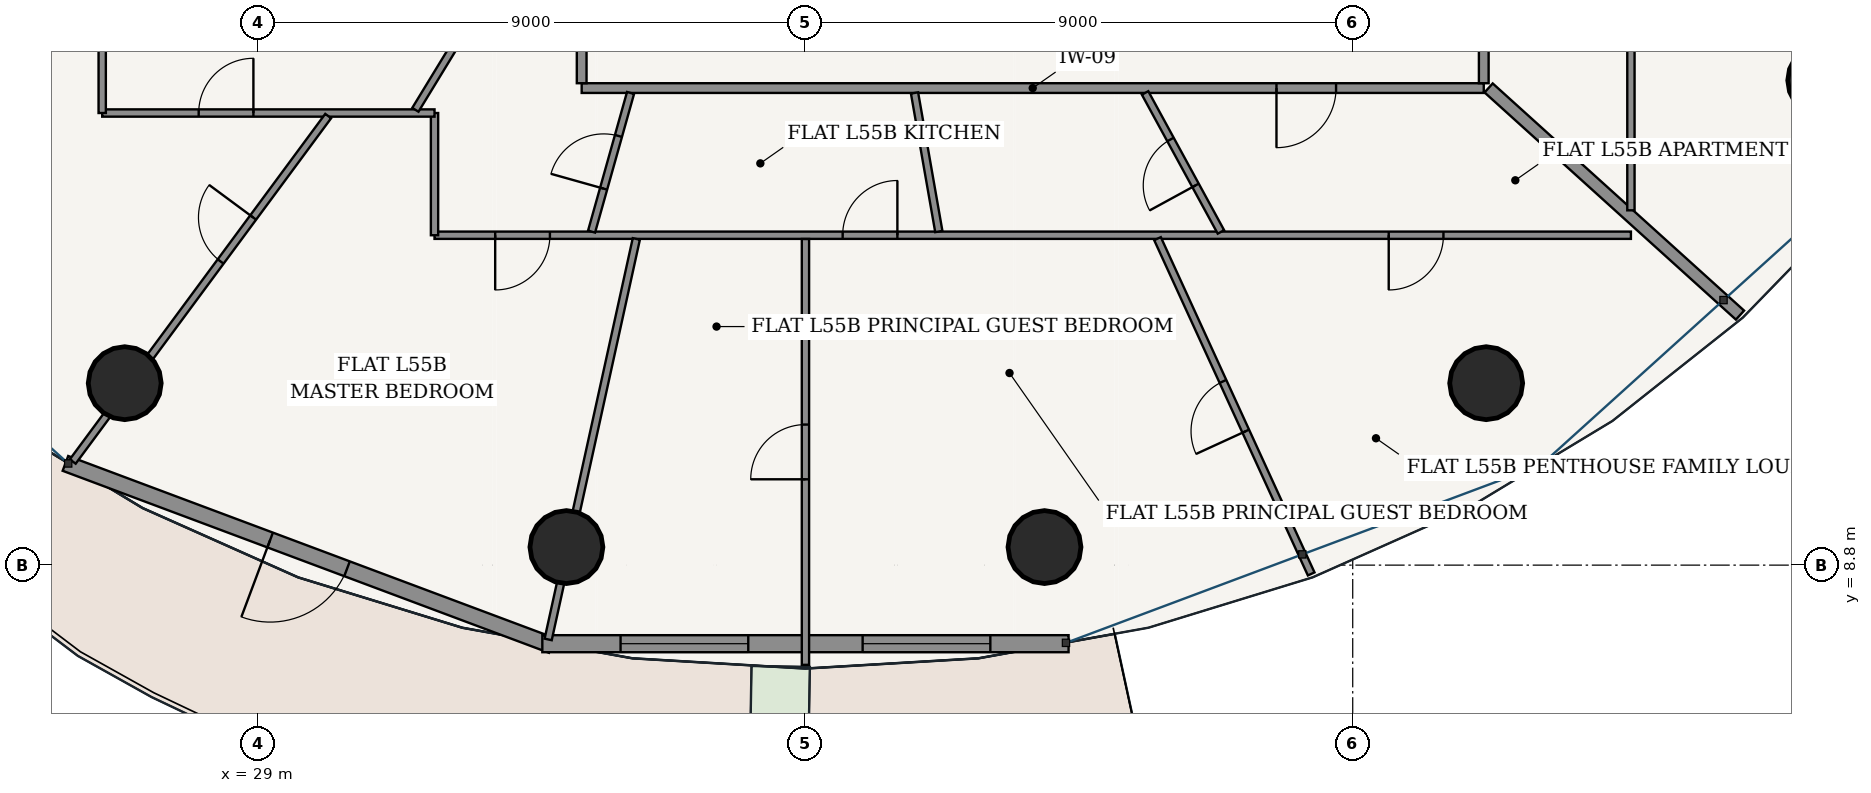
"""IFC4 building model, lengths in metres.
Left out: names, types, materials, properties, quantities, classifications, styles, units other than length and angle.
Written with IfcOpenShell. Run it as: python <this file> out.ifc"""

import sys

from ifc_helpers import new_model, si_unit, direction, frame, frame_2d, origin, origin_2d, place, context, subcontext, project, spatial, rectangle, hollow_circle, extrude, source, transform, mapped, element, fill, save


model = new_model("IFC4")
c1 = context("Model", 3, precision=1e-05, world=origin(), true_north=direction((-0.2419218956, 0.970295726276)))
c2 = subcontext(c1, "Body", "Model", "MODEL_VIEW")
j1 = project(units=[si_unit("LENGTHUNIT", "METRE"), si_unit("PLANEANGLEUNIT", "RADIAN")], contexts=[c1])
p1 = place(None, origin())
s1 = spatial("IfcSite", under=j1, at=p1, CompositionType="ELEMENT")
p2 = place(p1, origin())
s2 = spatial("IfcBuilding", under=s1, at=p2, CompositionType="ELEMENT")
p3 = place(p2, frame((0.0, 0.0, 209.7)))
s3 = spatial("IfcBuildingStorey", under=s2, at=p3, CompositionType="ELEMENT", Elevation=209.7)
for number, where, z_axis, x_axis in (
    (1, (26.805, 11.792, 0.0), (0.0, 0.0, 1.0), (1.0, 0.0, 0.0)),
    (2, (34.069, 9.097, 0.0), (0.0, 0.0, 1.0), (1.0, 0.0, 0.0)),
    (3, (41.931, 9.097, 0.0), (0.0, 0.0, 1.0), (1.0, 0.0, 0.0)),
    (4, (49.195, 11.792, 0.0), (0.0, 0.0, 1.0), (1.0, 0.0, 0.0)),
    (5, (54.754, 16.772, 0.0), (0.0, 0.0, 1.0), (1.0, 0.0, 0.0)),
):
    element("IfcColumn", number, at=place(p3, frame(where, z_axis=z_axis, x_axis=x_axis)), inside=s3, PredefinedType="COLUMN", context=c2, shape_type="SweptSolid", body=[
        extrude(hollow_circle(Radius=0.6, WallThickness=0.038, at=origin_2d()), origin(), (0.0, 0.0, 1.0), 3.7),
    ])
p4 = place(p3, frame((25.83, 10.473, 0.0), z_axis=(0.0, 0.0, 1.0), x_axis=(0.936556918375, -0.350515532672, 0.0)))
e6 = element("IfcWall", 6, at=p4, inside=s3, PredefinedType="SOLIDWALL", context=c2, shape_type="SweptSolid", body=[
    extrude(rectangle(XDim=8.539, YDim=0.26, at=frame_2d((4.27, 0.0))), origin(), (0.0, 0.0, 1.0), 3.435),
])
p5 = place(p4, frame((3.594, 0.0, 0.0)))
e7 = element("IfcOpeningElement", 7, at=p5, cuts=e6, PredefinedType="OPENING", context=c2, shape_type="SweptSolid", body=[
    extrude(rectangle(XDim=1.35, YDim=2.2, at=frame_2d((0.675, 1.1))), frame((0.0, 0.14, 0.0), z_axis=(0.0, -1.0, 0.0), x_axis=(1.0, 0.0, 0.0)), (0.0, 0.0, 1.0), 0.28),
])
p6 = place(p3, frame((33.673, 7.508, 0.0), z_axis=(0.0, 0.0, 1.0), x_axis=(1.0, 0.0, 0.0)))
e8 = element("IfcWall", 8, at=p6, inside=s3, PredefinedType="SOLIDWALL", context=c2, shape_type="SweptSolid", body=[
    extrude(rectangle(XDim=8.654, YDim=0.28, at=frame_2d((4.327, 0.0))), origin(), (0.0, 0.0, 1.0), 3.435),
])
p7 = place(p6, frame((1.287, 0.0, 0.85)))
e9 = element("IfcOpeningElement", 9, at=p7, cuts=e8, PredefinedType="OPENING", context=c2, shape_type="SweptSolid", body=[
    extrude(rectangle(XDim=2.1, YDim=1.95, at=frame_2d((1.05, 0.975))), frame((0.0, 0.15, 0.0), z_axis=(0.0, -1.0, 0.0), x_axis=(1.0, 0.0, 0.0)), (0.0, 0.0, 1.0), 0.3),
])
p8 = place(p6, frame((5.268, 0.0, 0.85)))
e10 = element("IfcOpeningElement", 10, at=p8, cuts=e8, PredefinedType="OPENING", context=c2, shape_type="SweptSolid", body=[
    extrude(rectangle(XDim=2.1, YDim=1.95, at=frame_2d((1.05, 0.975))), frame((0.0, 0.15, 0.0), z_axis=(0.0, -1.0, 0.0), x_axis=(1.0, 0.0, 0.0)), (0.0, 0.0, 1.0), 0.3),
])
p9 = place(p3, frame((34.32, 16.645, 0.0), z_axis=(0.0, 0.0, 1.0), x_axis=(1.0, 0.0, 0.0)))
e11 = element("IfcWall", 11, at=p9, inside=s3, PredefinedType="PARTITIONING", context=c2, shape_type="SweptSolid", body=[
    extrude(rectangle(XDim=14.835, YDim=0.16, at=frame_2d((7.417, 0.0))), origin(), (0.0, 0.0, 1.0), 2.951),
])
p10 = place(p9, frame((11.426, 0.0, 0.0)))
e12 = element("IfcOpeningElement", 12, at=p10, cuts=e11, PredefinedType="OPENING", context=c2, shape_type="SweptSolid", body=[
    extrude(rectangle(XDim=0.98, YDim=2.2, at=frame_2d((0.49, 1.1))), frame((0.0, 0.09, 0.0), z_axis=(0.0, -1.0, 0.0), x_axis=(1.0, 0.0, 0.0)), (0.0, 0.0, 1.0), 0.18),
])
p11 = place(p3, frame((34.32, 16.725, 0.0), z_axis=(0.0, 0.0, 1.0), x_axis=(0.0, 1.0, 0.0)))
e13 = element("IfcWall", 13, at=p11, inside=s3, PredefinedType="PARTITIONING", context=c2, shape_type="SweptSolid", body=[
    extrude(rectangle(XDim=1.85, YDim=0.16, at=frame_2d((0.925, 0.0))), origin(), (0.0, 0.0, 1.0), 3.435),
])
p12 = place(p3, frame((49.155, 16.725, 0.0), z_axis=(0.0, 0.0, 1.0), x_axis=(0.0, 1.0, 0.0)))
e14 = element("IfcWall", 14, at=p12, inside=s3, PredefinedType="PARTITIONING", context=c2, shape_type="SweptSolid", body=[
    extrude(rectangle(XDim=18.3, YDim=0.16, at=frame_2d((9.15, 0.0))), origin(), (0.0, 0.0, 1.0), 2.951),
])
p13 = place(p12, frame((15.302, 0.0, 0.0)))
e15 = element("IfcOpeningElement", 15, at=p13, cuts=e14, PredefinedType="OPENING", context=c2, shape_type="SweptSolid", body=[
    extrude(rectangle(XDim=0.98, YDim=2.2, at=frame_2d((0.49, 1.1))), frame((0.0, 0.09, 0.0), z_axis=(0.0, -1.0, 0.0), x_axis=(1.0, 0.0, 0.0)), (0.0, 0.0, 1.0), 0.18),
])
p14 = place(p3, frame((51.575, 14.225, 0.0), z_axis=(0.0, 0.0, 1.0), x_axis=(-1.0, 0.0, 0.0)))
e16 = element("IfcWall", 16, at=p14, inside=s3, PredefinedType="PARTITIONING", context=c2, shape_type="SweptSolid", body=[
    extrude(rectangle(XDim=19.675, YDim=0.12, at=frame_2d((9.837, 0.0))), origin(), (0.0, 0.0, 1.0), 2.951),
])
p15 = place(p14, frame((3.083, 0.0, 0.0)))
e17 = element("IfcOpeningElement", 17, at=p15, cuts=e16, PredefinedType="OPENING", context=c2, shape_type="SweptSolid", body=[
    extrude(rectangle(XDim=0.9, YDim=2.15, at=frame_2d((0.45, 1.075))), frame((0.0, 0.07, 0.0), z_axis=(0.0, -1.0, 0.0), x_axis=(1.0, 0.0, 0.0)), (0.0, 0.0, 1.0), 0.14),
])
p16 = place(p14, frame((12.063, 0.0, 0.0)))
e18 = element("IfcOpeningElement", 18, at=p16, cuts=e16, PredefinedType="OPENING", context=c2, shape_type="SweptSolid", body=[
    extrude(rectangle(XDim=0.9, YDim=2.15, at=frame_2d((0.45, 1.075))), frame((0.0, 0.07, 0.0), z_axis=(0.0, -1.0, 0.0), x_axis=(1.0, 0.0, 0.0)), (0.0, 0.0, 1.0), 0.14),
])
p17 = place(p14, frame((17.777, 0.0, 0.0)))
e19 = element("IfcOpeningElement", 19, at=p17, cuts=e16, PredefinedType="OPENING", context=c2, shape_type="SweptSolid", body=[
    extrude(rectangle(XDim=0.9, YDim=2.15, at=frame_2d((0.45, 1.075))), frame((0.0, 0.07, 0.0), z_axis=(0.0, -1.0, 0.0), x_axis=(1.0, 0.0, 0.0)), (0.0, 0.0, 1.0), 0.14),
])
p18 = place(p3, frame((31.9, 14.225, 0.0), z_axis=(0.0, 0.0, 1.0), x_axis=(0.0, 1.0, 0.0)))
e20 = element("IfcWall", 20, at=p18, inside=s3, PredefinedType="PARTITIONING", context=c2, shape_type="SweptSolid", body=[
    extrude(rectangle(XDim=2.01, YDim=0.12, at=frame_2d((1.005, 0.0))), origin(), (0.0, 0.0, 1.0), 3.11),
])
p19 = place(p3, frame((31.9, 16.235, 0.0), z_axis=(0.0, 0.0, 1.0), x_axis=(-1.0, 0.0, 0.0)))
e21 = element("IfcWall", 21, at=p19, inside=s3, PredefinedType="PARTITIONING", context=c2, shape_type="SweptSolid", body=[
    extrude(rectangle(XDim=5.465, YDim=0.12, at=frame_2d((2.732, 0.0))), origin(), (0.0, 0.0, 1.0), 2.951),
])
p20 = place(p19, frame((2.979, 0.0, 0.0)))
e22 = element("IfcOpeningElement", 22, at=p20, cuts=e21, PredefinedType="OPENING", context=c2, shape_type="SweptSolid", body=[
    extrude(rectangle(XDim=0.9, YDim=2.15, at=frame_2d((0.45, 1.075))), frame((0.0, 0.07, 0.0), z_axis=(0.0, -1.0, 0.0), x_axis=(1.0, 0.0, 0.0)), (0.0, 0.0, 1.0), 0.14),
])
p21 = place(p3, frame((26.435, 16.235, 0.0), z_axis=(0.0, 0.0, 1.0), x_axis=(0.0, 1.0, 0.0)))
e23 = element("IfcWall", 23, at=p21, inside=s3, PredefinedType="PARTITIONING", context=c2, shape_type="SweptSolid", body=[
    extrude(rectangle(XDim=5.665, YDim=0.12, at=frame_2d((2.833, 0.0))), origin(), (0.0, 0.0, 1.0), 2.951),
])
p22 = place(p21, frame((3.362, 0.0, 0.0)))
e24 = element("IfcOpeningElement", 24, at=p22, cuts=e23, PredefinedType="OPENING", context=c2, shape_type="SweptSolid", body=[
    extrude(rectangle(XDim=0.86, YDim=2.15, at=frame_2d((0.43, 1.075))), frame((0.0, 0.07, 0.0), z_axis=(0.0, -1.0, 0.0), x_axis=(1.0, 0.0, 0.0)), (0.0, 0.0, 1.0), 0.14),
])
p23 = place(p3, frame((30.151, 16.185, 0.0), z_axis=(0.0, 0.0, 1.0), x_axis=(-0.594540664599, -0.804065543434, 0.0)))
e25 = element("IfcWall", 25, at=p23, inside=s3, PredefinedType="PARTITIONING", context=c2, shape_type="SweptSolid", body=[
    extrude(rectangle(XDim=7.066, YDim=0.12, at=frame_2d((3.533, 0.0))), origin(), (0.0, 0.0, 1.0), 2.951),
])
p24 = place(p23, frame((2.075, 0.0, 0.0)))
e26 = element("IfcOpeningElement", 26, at=p24, cuts=e25, PredefinedType="OPENING", context=c2, shape_type="SweptSolid", body=[
    extrude(rectangle(XDim=0.9, YDim=2.15, at=frame_2d((0.45, 1.075))), frame((0.0, 0.07, 0.0), z_axis=(0.0, -1.0, 0.0), x_axis=(1.0, 0.0, 0.0)), (0.0, 0.0, 1.0), 0.14),
])
p25 = place(p3, frame((35.219, 14.165, 0.0), z_axis=(0.0, 0.0, 1.0), x_axis=(-0.214959845337, -0.976622887758, 0.0)))
e27 = element("IfcWall", 27, at=p25, inside=s3, PredefinedType="PARTITIONING", context=c2, shape_type="SweptSolid", body=[
    extrude(rectangle(XDim=6.744, YDim=0.12, at=frame_2d((3.372, 0.0))), origin(), (0.0, 0.0, 1.0), 2.951),
])
p26 = place(p3, frame((38.0, 14.163, 0.0), z_axis=(0.0, 0.0, 1.0), x_axis=(0.0, -1.0, 0.0)))
e28 = element("IfcWall", 28, at=p26, inside=s3, PredefinedType="PARTITIONING", context=c2, shape_type="SweptSolid", body=[
    extrude(rectangle(XDim=7.003, YDim=0.12, at=frame_2d((3.501, 0.0))), origin(), (0.0, 0.0, 1.0), 2.951),
])
p27 = place(p26, frame((3.052, 0.0, 0.0)))
e29 = element("IfcOpeningElement", 29, at=p27, cuts=e28, PredefinedType="OPENING", context=c2, shape_type="SweptSolid", body=[
    extrude(rectangle(XDim=0.9, YDim=2.15, at=frame_2d((0.45, 1.075))), frame((0.0, 0.07, 0.0), z_axis=(0.0, -1.0, 0.0), x_axis=(1.0, 0.0, 0.0)), (0.0, 0.0, 1.0), 0.14),
])
p28 = place(p3, frame((43.79, 14.169, 0.0), z_axis=(0.0, 0.0, 1.0), x_axis=(0.416687974363, -0.909049576218, 0.0)))
e30 = element("IfcWall", 30, at=p28, inside=s3, PredefinedType="PARTITIONING", context=c2, shape_type="SweptSolid", body=[
    extrude(rectangle(XDim=6.065, YDim=0.12, at=frame_2d((3.033, 0.0))), origin(), (0.0, 0.0, 1.0), 2.951),
])
p29 = place(p28, frame((2.583, 0.0, 0.0)))
e31 = element("IfcOpeningElement", 31, at=p29, cuts=e30, PredefinedType="OPENING", context=c2, shape_type="SweptSolid", body=[
    extrude(rectangle(XDim=0.9, YDim=2.15, at=frame_2d((0.45, 1.075))), frame((0.0, 0.07, 0.0), z_axis=(0.0, -1.0, 0.0), x_axis=(1.0, 0.0, 0.0)), (0.0, 0.0, 1.0), 0.14),
])
p30 = place(p3, frame((32.981, 18.575, 0.0), z_axis=(0.0, 0.0, 1.0), x_axis=(-0.520926540997, -0.853601510592, 0.0)))
e32 = element("IfcWall", 32, at=p30, inside=s3, PredefinedType="PARTITIONING", context=c2, shape_type="SweptSolid", body=[
    extrude(rectangle(XDim=2.679, YDim=0.12, at=frame_2d((1.34, 0.0))), origin(), (0.0, 0.0, 1.0), 3.435),
])
p31 = place(p3, frame((35.124, 16.565, 0.0), z_axis=(0.0, 0.0, 1.0), x_axis=(-0.270566477163, -0.962701293982, 0.0)))
e33 = element("IfcWall", 33, at=p31, inside=s3, PredefinedType="PARTITIONING", context=c2, shape_type="SweptSolid", body=[
    extrude(rectangle(XDim=2.369, YDim=0.12, at=frame_2d((1.184, 0.0))), origin(), (0.0, 0.0, 1.0), 3.435),
])
p32 = place(p31, frame((0.734, 0.0, 0.0)))
e34 = element("IfcOpeningElement", 34, at=p32, cuts=e33, PredefinedType="OPENING", context=c2, shape_type="SweptSolid", body=[
    extrude(rectangle(XDim=0.9, YDim=2.15, at=frame_2d((0.45, 1.075))), frame((0.0, 0.07, 0.0), z_axis=(0.0, -1.0, 0.0), x_axis=(1.0, 0.0, 0.0)), (0.0, 0.0, 1.0), 0.14),
])
p33 = place(p3, frame((39.794, 16.565, 0.0), z_axis=(0.0, 0.0, 1.0), x_axis=(0.172641422295, -0.984984740647, 0.0)))
e35 = element("IfcWall", 35, at=p33, inside=s3, PredefinedType="PARTITIONING", context=c2, shape_type="SweptSolid", body=[
    extrude(rectangle(XDim=2.313, YDim=0.12, at=frame_2d((1.157, 0.0))), origin(), (0.0, 0.0, 1.0), 3.435),
])
p34 = place(p3, frame((43.585, 16.565, 0.0), z_axis=(0.0, 0.0, 1.0), x_axis=(0.479068920965, -0.877777288932, 0.0)))
e36 = element("IfcWall", 36, at=p34, inside=s3, PredefinedType="PARTITIONING", context=c2, shape_type="SweptSolid", body=[
    extrude(rectangle(XDim=2.604, YDim=0.12, at=frame_2d((1.302, 0.0))), origin(), (0.0, 0.0, 1.0), 3.11),
])
p35 = place(p34, frame((0.872, 0.0, 0.0)))
e37 = element("IfcOpeningElement", 37, at=p35, cuts=e36, PredefinedType="OPENING", context=c2, shape_type="SweptSolid", body=[
    extrude(rectangle(XDim=0.86, YDim=2.15, at=frame_2d((0.43, 1.075))), frame((0.0, 0.07, 0.0), z_axis=(0.0, -1.0, 0.0), x_axis=(1.0, 0.0, 0.0)), (0.0, 0.0, 1.0), 0.14),
])
p36 = place(p3, frame((49.235, 16.647, 0.0), z_axis=(0.0, 0.0, 1.0), x_axis=(0.741935290449, -0.670471494387, 0.0)))
e38 = element("IfcWall", 38, at=p36, inside=s3, PredefinedType="PARTITIONING", context=c2, shape_type="SweptSolid", body=[
    extrude(rectangle(XDim=5.572, YDim=0.2, at=frame_2d((2.786, 0.0))), origin(), (0.0, 0.0, 1.0), 2.951),
])
p37 = place(p3, frame((51.575, 37.525, 0.0), z_axis=(0.0, 0.0, 1.0), x_axis=(0.0, -1.0, 0.0)))
e39 = element("IfcWall", 39, at=p37, inside=s3, PredefinedType="PARTITIONING", context=c2, shape_type="SweptSolid", body=[
    extrude(rectangle(XDim=22.89, YDim=0.12, at=frame_2d((11.445, 0.0))), origin(), (0.0, 0.0, 1.0), 2.951),
])
p38 = place(p37, frame((4.102, 0.0, 0.0)))
e40 = element("IfcOpeningElement", 40, at=p38, cuts=e39, PredefinedType="OPENING", context=c2, shape_type="SweptSolid", body=[
    extrude(rectangle(XDim=0.9, YDim=2.15, at=frame_2d((0.45, 1.075))), frame((0.0, 0.07, 0.0), z_axis=(0.0, -1.0, 0.0), x_axis=(1.0, 0.0, 0.0)), (0.0, 0.0, 1.0), 0.14),
])
p39 = place(p37, frame((19.163, 0.0, 0.0)))
e41 = element("IfcOpeningElement", 41, at=p39, cuts=e39, PredefinedType="OPENING", context=c2, shape_type="SweptSolid", body=[
    extrude(rectangle(XDim=0.86, YDim=2.15, at=frame_2d((0.43, 1.075))), frame((0.0, 0.07, 0.0), z_axis=(0.0, -1.0, 0.0), x_axis=(1.0, 0.0, 0.0)), (0.0, 0.0, 1.0), 0.14),
])
p40 = place(p37, frame((13.046, 0.0, 0.0)))
e42 = element("IfcOpeningElement", 42, at=p40, cuts=e39, PredefinedType="OPENING", context=c2, shape_type="SweptSolid", body=[
    extrude(rectangle(XDim=0.9, YDim=2.15, at=frame_2d((0.45, 1.075))), frame((0.0, 0.07, 0.0), z_axis=(0.0, -1.0, 0.0), x_axis=(1.0, 0.0, 0.0)), (0.0, 0.0, 1.0), 0.14),
])
m1 = source(origin(), c2, "Body", "SweptSolid", [
    extrude(rectangle(XDim=1.35, YDim=2.2, at=frame_2d((0.675, 1.1))), frame((0.0, 0.025, 0.0), z_axis=(0.0, -1.0, 0.0), x_axis=(1.0, 0.0, 0.0)), (0.0, 0.0, 1.0), 0.05),
])
p41 = place(p5, frame((1.35, 0.0, 0.0), z_axis=(0.0, 0.0, 1.0), x_axis=(-1.0, 0.0, 0.0)))
e43 = element("IfcDoor", 43, at=p41, inside=s3, OperationType="SINGLE_SWING_RIGHT", PredefinedType="DOOR", context=c2, shape_type="MappedRepresentation", body=[
    mapped(m1, transform((0.0, 0.0, 0.0), scale=1.0)),
])
fill(e7, e43)
m2 = source(origin(), c2, "Body", "SweptSolid", [
    extrude(rectangle(XDim=2.1, YDim=1.95, at=frame_2d((1.05, 0.975))), frame((0.0, 0.03, 0.0), z_axis=(0.0, -1.0, 0.0), x_axis=(1.0, 0.0, 0.0)), (0.0, 0.0, 1.0), 0.06),
])
p42 = place(p7, origin())
e44 = element("IfcWindow", 44, at=p42, inside=s3, PartitioningType="SINGLE_PANEL", PredefinedType="WINDOW", context=c2, shape_type="MappedRepresentation", body=[
    mapped(m2, transform((0.0, 0.0, 0.0), scale=1.0)),
])
fill(e9, e44)
p43 = place(p8, origin())
e45 = element("IfcWindow", 45, at=p43, inside=s3, PartitioningType="SINGLE_PANEL", PredefinedType="WINDOW", context=c2, shape_type="MappedRepresentation", body=[
    mapped(m2, transform((0.0, 0.0, 0.0), scale=1.0)),
])
fill(e10, e45)
m3 = source(origin(), c2, "Body", "SweptSolid", [
    extrude(rectangle(XDim=0.98, YDim=2.2, at=frame_2d((0.49, 1.1))), frame((0.0, 0.025, 0.0), z_axis=(0.0, -1.0, 0.0), x_axis=(1.0, 0.0, 0.0)), (0.0, 0.0, 1.0), 0.05),
])
p44 = place(p10, frame((0.98, 0.0, 0.0), z_axis=(0.0, 0.0, 1.0), x_axis=(-1.0, 0.0, 0.0)))
e46 = element("IfcDoor", 46, at=p44, inside=s3, OperationType="SINGLE_SWING_RIGHT", PredefinedType="DOOR", context=c2, shape_type="MappedRepresentation", body=[
    mapped(m3, transform((0.0, 0.0, 0.0), scale=1.0)),
])
fill(e12, e46)
m4 = source(origin(), c2, "Body", "SweptSolid", [
    extrude(rectangle(XDim=0.86, YDim=2.15, at=frame_2d((0.43, 1.075))), frame((0.0, 0.025, 0.0), z_axis=(0.0, -1.0, 0.0), x_axis=(1.0, 0.0, 0.0)), (0.0, 0.0, 1.0), 0.05),
])
p45 = place(p35, frame((0.86, 0.0, 0.0), z_axis=(0.0, 0.0, 1.0), x_axis=(-1.0, 0.0, 0.0)))
e47 = element("IfcDoor", 47, at=p45, inside=s3, OperationType="SINGLE_SWING_LEFT", PredefinedType="DOOR", context=c2, shape_type="MappedRepresentation", body=[
    mapped(m4, transform((0.0, 0.0, 0.0), scale=1.0)),
])
fill(e37, e47)
m5 = source(origin(), c2, "Body", "SweptSolid", [
    extrude(rectangle(XDim=0.9, YDim=2.15, at=frame_2d((0.45, 1.075))), frame((0.0, 0.025, 0.0), z_axis=(0.0, -1.0, 0.0), x_axis=(1.0, 0.0, 0.0)), (0.0, 0.0, 1.0), 0.05),
])
p46 = place(p15, origin())
e48 = element("IfcDoor", 48, at=p46, inside=s3, OperationType="SINGLE_SWING_RIGHT", PredefinedType="DOOR", context=c2, shape_type="MappedRepresentation", body=[
    mapped(m5, transform((0.0, 0.0, 0.0), scale=1.0)),
])
fill(e17, e48)
p47 = place(p29, frame((0.9, 0.0, 0.0), z_axis=(0.0, 0.0, 1.0), x_axis=(-1.0, 0.0, 0.0)))
e49 = element("IfcDoor", 49, at=p47, inside=s3, OperationType="SINGLE_SWING_LEFT", PredefinedType="DOOR", context=c2, shape_type="MappedRepresentation", body=[
    mapped(m5, transform((0.0, 0.0, 0.0), scale=1.0)),
])
fill(e31, e49)
p48 = place(p16, frame((0.9, 0.0, 0.0), z_axis=(0.0, 0.0, 1.0), x_axis=(-1.0, 0.0, 0.0)))
e50 = element("IfcDoor", 50, at=p48, inside=s3, OperationType="SINGLE_SWING_RIGHT", PredefinedType="DOOR", context=c2, shape_type="MappedRepresentation", body=[
    mapped(m5, transform((0.0, 0.0, 0.0), scale=1.0)),
])
fill(e18, e50)
p49 = place(p32, frame((0.9, 0.0, 0.0), z_axis=(0.0, 0.0, 1.0), x_axis=(-1.0, 0.0, 0.0)))
e51 = element("IfcDoor", 51, at=p49, inside=s3, OperationType="SINGLE_SWING_LEFT", PredefinedType="DOOR", context=c2, shape_type="MappedRepresentation", body=[
    mapped(m5, transform((0.0, 0.0, 0.0), scale=1.0)),
])
fill(e34, e51)
p50 = place(p17, origin())
e52 = element("IfcDoor", 52, at=p50, inside=s3, OperationType="SINGLE_SWING_RIGHT", PredefinedType="DOOR", context=c2, shape_type="MappedRepresentation", body=[
    mapped(m5, transform((0.0, 0.0, 0.0), scale=1.0)),
])
fill(e19, e52)
p51 = place(p27, frame((0.9, 0.0, 0.0), z_axis=(0.0, 0.0, 1.0), x_axis=(-1.0, 0.0, 0.0)))
e53 = element("IfcDoor", 53, at=p51, inside=s3, OperationType="SINGLE_SWING_LEFT", PredefinedType="DOOR", context=c2, shape_type="MappedRepresentation", body=[
    mapped(m5, transform((0.0, 0.0, 0.0), scale=1.0)),
])
fill(e29, e53)
p52 = place(p24, frame((0.9, 0.0, 0.0), z_axis=(0.0, 0.0, 1.0), x_axis=(-1.0, 0.0, 0.0)))
e54 = element("IfcDoor", 54, at=p52, inside=s3, OperationType="SINGLE_SWING_RIGHT", PredefinedType="DOOR", context=c2, shape_type="MappedRepresentation", body=[
    mapped(m5, transform((0.0, 0.0, 0.0), scale=1.0)),
])
fill(e26, e54)
p53 = place(p20, frame((0.9, 0.0, 0.0), z_axis=(0.0, 0.0, 1.0), x_axis=(-1.0, 0.0, 0.0)))
e55 = element("IfcDoor", 55, at=p53, inside=s3, OperationType="SINGLE_SWING_RIGHT", PredefinedType="DOOR", context=c2, shape_type="MappedRepresentation", body=[
    mapped(m5, transform((0.0, 0.0, 0.0), scale=1.0)),
])
fill(e22, e55)
save(model, sys.argv[1])
